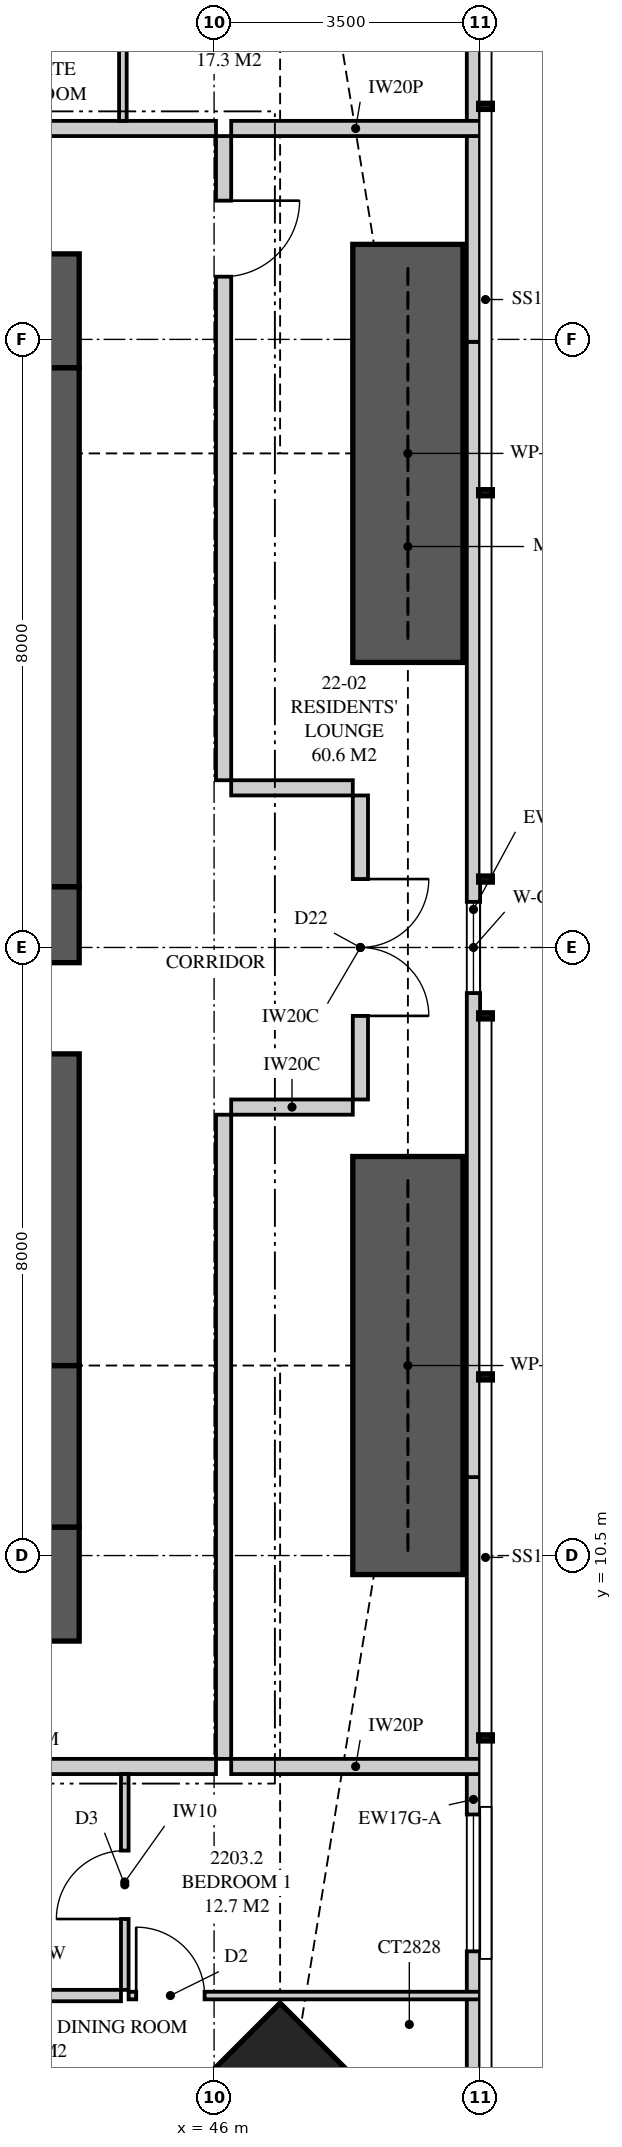
"""IFC4 building model, lengths in metres.
Left out: names, types, materials, properties, quantities, classifications, styles, units other than length and angle.
Written with IfcOpenShell. Run it as: python <this file> out.ifc"""

import sys

from ifc_helpers import new_model, si_unit, direction, frame, frame_2d, origin, origin_2d, place, context, subcontext, project, spatial, polyline, rectangle, hollow_rectangle, outline, extrude, element, fill, save


model = new_model("IFC4")
c1 = context("Model", 3, precision=1e-05, world=origin(), true_north=direction((0.0, 1.0)))
c2 = subcontext(c1, "Body", "Model", "MODEL_VIEW")
j1 = project(units=[si_unit("LENGTHUNIT", "METRE"), si_unit("PLANEANGLEUNIT", "RADIAN")], contexts=[c1])
p1 = place(None, origin())
s1 = spatial("IfcSite", under=j1, at=p1, CompositionType="ELEMENT")
p2 = place(p1, origin())
s2 = spatial("IfcBuilding", under=s1, at=p2, CompositionType="ELEMENT")
p3 = place(p2, frame((0.0, 0.0, 84.75)))
s3 = spatial("IfcBuildingStorey", under=s2, at=p3, CompositionType="ELEMENT", Elevation=84.75)
p4 = place(p3, frame((46.869, 2.631, 0.0), z_axis=(0.0, 0.0, 1.0), x_axis=(-0.707106781187, 0.707106781187, 0.0)))
e1 = element("IfcColumn", 1, at=p4, inside=s3, PredefinedType="COLUMN", context=c2, shape_type="SweptSolid", body=[
    extrude(hollow_rectangle(XDim=2.8, YDim=2.8, WallThickness=0.25, at=origin_2d()), origin(), (0.0, 0.0, 1.0), 3.35),
])
p5 = place(p3, frame((35.9, 10.125, 0.0), z_axis=(0.0, 0.0, 1.0), x_axis=(1.0, 0.0, 0.0)))
e2 = element("IfcWall", 2, at=p5, inside=s3, PredefinedType="SHEAR", context=c2, shape_type="SweptSolid", body=[
    extrude(rectangle(XDim=8.325, YDim=1.5, at=frame_2d((4.163, 0.0))), origin(), (0.0, 0.0, 1.0), 3.35),
])
p6 = place(p5, frame((2.7, 0.0, 0.0)))
e3 = element("IfcOpeningElement", 3, at=p6, cuts=e2, PredefinedType="OPENING", context=c2, shape_type="SweptSolid", body=[
    extrude(rectangle(XDim=1.0, YDim=2.1, at=frame_2d((0.5, 1.05))), frame((0.0, 0.76, 0.0), z_axis=(0.0, -1.0, 0.0), x_axis=(1.0, 0.0, 0.0)), (0.0, 0.0, 1.0), 1.52),
])
p7 = place(p3, frame((44.225, 26.875, 0.0), z_axis=(0.0, 0.0, 1.0), x_axis=(-1.0, 0.0, 0.0)))
e4 = element("IfcWall", 4, at=p7, inside=s3, PredefinedType="SHEAR", context=c2, shape_type="SweptSolid", body=[
    extrude(rectangle(XDim=8.325, YDim=1.5, at=frame_2d((4.163, 0.0))), origin(), (0.0, 0.0, 1.0), 3.35),
])
p8 = place(p7, frame((5.725, 0.0, 0.0)))
e5 = element("IfcOpeningElement", 5, at=p8, cuts=e4, PredefinedType="OPENING", context=c2, shape_type="SweptSolid", body=[
    extrude(rectangle(XDim=0.9, YDim=2.1, at=frame_2d((0.45, 1.05))), frame((0.0, 0.76, 0.0), z_axis=(0.0, -1.0, 0.0), x_axis=(1.0, 0.0, 0.0)), (0.0, 0.0, 1.0), 1.52),
])
p9 = place(p3, frame((43.8, 10.875, 0.0), z_axis=(0.0, 0.0, 1.0), x_axis=(0.0, 1.0, 0.0)))
e6 = element("IfcWall", 6, at=p9, inside=s3, PredefinedType="SHEAR", context=c2, shape_type="SweptSolid", body=[
    extrude(rectangle(XDim=2.125, YDim=0.85, at=frame_2d((1.062, 0.0))), origin(), (0.0, 0.0, 1.0), 3.35),
])
p10 = place(p3, frame((43.8, 13.0, 0.0), z_axis=(0.0, 0.0, 1.0), x_axis=(0.0, 1.0, 0.0)))
e7 = element("IfcWall", 7, at=p10, inside=s3, PredefinedType="SHEAR", context=c2, shape_type="SweptSolid", body=[
    extrude(rectangle(XDim=6.3, YDim=0.85, at=frame_2d((3.15, 0.0))), origin(), (0.0, 0.0, 1.0), 3.35),
])
p11 = place(p10, frame((4.1, 0.0, 0.0)))
e8 = element("IfcOpeningElement", 8, at=p11, cuts=e7, PredefinedType="OPENING", context=c2, shape_type="SweptSolid", body=[
    extrude(rectangle(XDim=1.2, YDim=2.2, at=frame_2d((0.6, 1.1))), frame((0.0, 0.435, 0.0), z_axis=(0.0, -1.0, 0.0), x_axis=(1.0, 0.0, 0.0)), (0.0, 0.0, 1.0), 0.87),
])
p12 = place(p3, frame((43.8, 19.3, 0.0), z_axis=(0.0, 0.0, 1.0), x_axis=(0.0, 1.0, 0.0)))
e9 = element("IfcWall", 9, at=p12, inside=s3, PredefinedType="SHEAR", context=c2, shape_type="SweptSolid", body=[
    extrude(rectangle(XDim=6.825, YDim=0.85, at=frame_2d((3.413, 0.0))), origin(), (0.0, 0.0, 1.0), 3.35),
])
p13 = place(p3, frame((49.413, 3.051, 0.0), z_axis=(0.0, 0.0, 1.0), x_axis=(0.0, 1.0, 0.0)))
e10 = element("IfcWall", 10, at=p13, inside=s3, PredefinedType="SOLIDWALL", context=c2, shape_type="SweptSolid", body=[
    extrude(rectangle(XDim=8.481, YDim=0.175, at=frame_2d((4.24, 0.0))), origin(), (0.0, 0.0, 1.0), 3.11),
])
p14 = place(p13, frame((2.242, 0.0, 0.4)))
e11 = element("IfcOpeningElement", 11, at=p14, cuts=e10, PredefinedType="OPENING", context=c2, shape_type="SweptSolid", body=[
    extrude(rectangle(XDim=1.8, YDim=1.7, at=frame_2d((0.9, 0.85))), frame((0.0, 0.097, 0.0), z_axis=(0.0, -1.0, 0.0), x_axis=(1.0, 0.0, 0.0)), (0.0, 0.0, 1.0), 0.195),
])
p15 = place(p3, frame((49.413, 11.532, 0.0), z_axis=(0.0, 0.0, 1.0), x_axis=(0.0, 1.0, 0.0)))
e12 = element("IfcWall", 12, at=p15, inside=s3, PredefinedType="SOLIDWALL", context=c2, shape_type="SweptSolid", body=[
    extrude(rectangle(XDim=14.936, YDim=0.175, at=frame_2d((7.468, 0.0))), origin(), (0.0, 0.0, 1.0), 2.15),
])
p16 = place(p15, frame((6.368, 0.0, 0.4)))
e13 = element("IfcOpeningElement", 13, at=p16, cuts=e12, PredefinedType="OPENING", context=c2, shape_type="SweptSolid", body=[
    extrude(rectangle(XDim=1.2, YDim=1.7, at=frame_2d((0.6, 0.85))), frame((0.0, 0.097, 0.0), z_axis=(0.0, -1.0, 0.0), x_axis=(1.0, 0.0, 0.0)), (0.0, 0.0, 1.0), 0.195),
])
p17 = place(p3, frame((49.413, 26.468, 0.0), z_axis=(0.0, 0.0, 1.0), x_axis=(0.0, 1.0, 0.0)))
e14 = element("IfcWall", 14, at=p17, inside=s3, PredefinedType="SOLIDWALL", context=c2, shape_type="SweptSolid", body=[
    extrude(rectangle(XDim=8.481, YDim=0.175, at=frame_2d((4.24, 0.0))), origin(), (0.0, 0.0, 1.0), 3.11),
])
p18 = place(p17, frame((3.939, 0.0, 0.4)))
e15 = element("IfcOpeningElement", 15, at=p18, cuts=e14, PredefinedType="OPENING", context=c2, shape_type="SweptSolid", body=[
    extrude(rectangle(XDim=1.8, YDim=1.7, at=frame_2d((0.9, 0.85))), frame((0.0, 0.097, 0.0), z_axis=(0.0, -1.0, 0.0), x_axis=(1.0, 0.0, 0.0)), (0.0, 0.0, 1.0), 0.195),
])
p19 = place(p3, frame((37.925, 7.725, 0.0), z_axis=(0.0, 0.0, 1.0), x_axis=(1.0, 0.0, 0.0)))
e16 = element("IfcWall", 16, at=p19, inside=s3, PredefinedType="PARTITIONING", context=c2, shape_type="SweptSolid", body=[
    extrude(outline(polyline([(0.0, 0.0), (8.1, 0.0), (8.1, 3.11), (1.046, 3.11), (1.046, 2.531), (0.354, 2.531), (0.354, 3.11), (0.0, 3.11), (0.0, 0.0)])), frame((0.0, 0.1, 0.0), z_axis=(0.0, -1.0, 0.0), x_axis=(1.0, 0.0, 0.0)), (0.0, 0.0, 1.0), 0.2),
])
p20 = place(p19, frame((2.4, 0.0, 0.0)))
e17 = element("IfcOpeningElement", 17, at=p20, cuts=e16, PredefinedType="OPENING", context=c2, shape_type="SweptSolid", body=[
    extrude(rectangle(XDim=1.05, YDim=2.2, at=frame_2d((0.525, 1.1))), frame((0.0, 0.11, 0.0), z_axis=(0.0, -1.0, 0.0), x_axis=(1.0, 0.0, 0.0)), (0.0, 0.0, 1.0), 0.22),
])
p21 = place(p3, frame((44.825, 4.786, 0.0), z_axis=(0.0, 0.0, 1.0), x_axis=(0.0, 1.0, 0.0)))
e18 = element("IfcWall", 18, at=p21, inside=s3, PredefinedType="PARTITIONING", context=c2, shape_type="SweptSolid", body=[
    extrude(rectangle(XDim=2.839, YDim=0.1, at=frame_2d((1.419, 0.0))), origin(), (0.0, 0.0, 1.0), 3.11),
])
p22 = place(p21, frame((0.932, 0.0, 0.0)))
e19 = element("IfcOpeningElement", 19, at=p22, cuts=e18, PredefinedType="OPENING", context=c2, shape_type="SweptSolid", body=[
    extrude(rectangle(XDim=0.9, YDim=2.1, at=frame_2d((0.45, 1.05))), frame((0.0, 0.06, 0.0), z_axis=(0.0, -1.0, 0.0), x_axis=(1.0, 0.0, 0.0)), (0.0, 0.0, 1.0), 0.12),
])
p23 = place(p3, frame((44.875, 4.711, 0.0), z_axis=(0.0, 0.0, 1.0), x_axis=(1.0, 0.0, 0.0)))
e20 = element("IfcWall", 20, at=p23, inside=s3, PredefinedType="PARTITIONING", context=c2, shape_type="SweptSolid", body=[
    extrude(outline(polyline([(0.0, 0.0), (4.625, 0.0), (4.625, 3.11), (3.405, 3.11), (3.405, 2.15), (1.257, 2.15), (1.257, 3.11), (0.0, 3.11), (0.0, 0.0)])), frame((0.0, 0.05, 0.0), z_axis=(0.0, -1.0, 0.0), x_axis=(1.0, 0.0, 0.0)), (0.0, 0.0, 1.0), 0.1),
])
p24 = place(p23, frame((0.1, 0.0, 0.0)))
e21 = element("IfcOpeningElement", 21, at=p24, cuts=e20, PredefinedType="OPENING", context=c2, shape_type="SweptSolid", body=[
    extrude(rectangle(XDim=0.9, YDim=2.1, at=frame_2d((0.45, 1.05))), frame((0.0, 0.06, 0.0), z_axis=(0.0, -1.0, 0.0), x_axis=(1.0, 0.0, 0.0)), (0.0, 0.0, 1.0), 0.12),
])
p25 = place(p3, frame((42.5, 4.711, 0.0), z_axis=(0.0, 0.0, 1.0), x_axis=(1.0, 0.0, 0.0)))
e22 = element("IfcWall", 22, at=p25, inside=s3, PredefinedType="PLUMBINGWALL", context=c2, shape_type="SweptSolid", body=[
    extrude(rectangle(XDim=2.275, YDim=0.15, at=frame_2d((1.137, 0.0))), origin(), (0.0, 0.0, 1.0), 3.11),
])
p26 = place(p3, frame((46.225, 7.725, 0.0), z_axis=(0.0, 0.0, 1.0), x_axis=(1.0, 0.0, 0.0)))
e23 = element("IfcWall", 23, at=p26, inside=s3, PredefinedType="PARTITIONING", context=c2, shape_type="SweptSolid", body=[
    extrude(outline(polyline([(0.0, 0.0), (3.275, 0.0), (3.275, 3.11), (2.594, 3.11), (2.594, 2.15), (0.44, 2.15), (0.44, 2.531), (0.297, 2.531), (0.297, 3.11), (0.0, 3.11), (0.0, 0.0)])), frame((0.0, 0.1, 0.0), z_axis=(0.0, -1.0, 0.0), x_axis=(1.0, 0.0, 0.0)), (0.0, 0.0, 1.0), 0.2),
])
p27 = place(p3, frame((37.6, 29.275, 0.0), z_axis=(0.0, 0.0, 1.0), x_axis=(1.0, 0.0, 0.0)))
e24 = element("IfcWall", 24, at=p27, inside=s3, PredefinedType="PARTITIONING", context=c2, shape_type="SweptSolid", body=[
    extrude(outline(polyline([(0.0, 0.0), (8.425, 0.0), (8.425, 3.11), (1.371, 3.11), (1.371, 2.531), (0.679, 2.531), (0.679, 3.11), (0.0, 3.11), (0.0, 0.0)])), frame((0.0, 0.1, 0.0), z_axis=(0.0, -1.0, 0.0), x_axis=(1.0, 0.0, 0.0)), (0.0, 0.0, 1.0), 0.2),
])
p28 = place(p27, frame((2.4, 0.0, 0.0)))
e25 = element("IfcOpeningElement", 25, at=p28, cuts=e24, PredefinedType="OPENING", context=c2, shape_type="SweptSolid", body=[
    extrude(rectangle(XDim=1.05, YDim=2.2, at=frame_2d((0.525, 1.1))), frame((0.0, 0.11, 0.0), z_axis=(0.0, -1.0, 0.0), x_axis=(1.0, 0.0, 0.0)), (0.0, 0.0, 1.0), 0.22),
])
p29 = place(p3, frame((44.8, 33.214, 0.0), z_axis=(0.0, 0.0, 1.0), x_axis=(0.0, -1.0, 0.0)))
e26 = element("IfcWall", 26, at=p29, inside=s3, PredefinedType="PARTITIONING", context=c2, shape_type="SweptSolid", body=[
    extrude(rectangle(XDim=3.839, YDim=0.1, at=frame_2d((1.919, 0.0))), origin(), (0.0, 0.0, 1.0), 3.11),
])
p30 = place(p29, frame((1.432, 0.0, 0.0)))
e27 = element("IfcOpeningElement", 27, at=p30, cuts=e26, PredefinedType="OPENING", context=c2, shape_type="SweptSolid", body=[
    extrude(rectangle(XDim=0.9, YDim=2.1, at=frame_2d((0.45, 1.05))), frame((0.0, 0.06, 0.0), z_axis=(0.0, -1.0, 0.0), x_axis=(1.0, 0.0, 0.0)), (0.0, 0.0, 1.0), 0.12),
])
p31 = place(p3, frame((46.225, 29.275, 0.0), z_axis=(0.0, 0.0, 1.0), x_axis=(1.0, 0.0, 0.0)))
e28 = element("IfcWall", 28, at=p31, inside=s3, PredefinedType="PARTITIONING", context=c2, shape_type="SweptSolid", body=[
    extrude(outline(polyline([(0.0, 0.0), (3.275, 0.0), (3.275, 3.11), (2.756, 3.11), (2.756, 2.15), (0.603, 2.15), (0.603, 2.531), (0.297, 2.531), (0.297, 3.11), (0.0, 3.11), (0.0, 0.0)])), frame((0.0, 0.1, 0.0), z_axis=(0.0, -1.0, 0.0), x_axis=(1.0, 0.0, 0.0)), (0.0, 0.0, 1.0), 0.2),
])
p32 = place(p3, frame((46.125, 7.825, 0.0), z_axis=(0.0, 0.0, 1.0), x_axis=(0.0, 1.0, 0.0)))
e29 = element("IfcWall", 29, at=p32, inside=s3, PredefinedType="PARTITIONING", context=c2, shape_type="SweptSolid", body=[
    extrude(outline(polyline([(0.0, 0.0), (8.475, 0.0), (8.475, 3.11), (5.521, 3.11), (5.521, 2.531), (4.829, 2.531), (4.829, 3.11), (0.0, 3.11), (0.0, 0.0)])), frame((0.0, 0.1, 0.0), z_axis=(0.0, -1.0, 0.0), x_axis=(1.0, 0.0, 0.0)), (0.0, 0.0, 1.0), 0.2),
])
p33 = place(p3, frame((46.125, 20.7, 0.0), z_axis=(0.0, 0.0, 1.0), x_axis=(0.0, 1.0, 0.0)))
e30 = element("IfcWall", 30, at=p33, inside=s3, PredefinedType="PARTITIONING", context=c2, shape_type="SweptSolid", body=[
    extrude(outline(polyline([(0.0, 0.0), (8.475, 0.0), (8.475, 3.11), (4.646, 3.11), (4.646, 2.531), (3.954, 2.531), (3.954, 3.11), (0.0, 3.11), (0.0, 0.0)])), frame((0.0, 0.1, 0.0), z_axis=(0.0, -1.0, 0.0), x_axis=(1.0, 0.0, 0.0)), (0.0, 0.0, 1.0), 0.2),
])
p34 = place(p33, frame((6.625, 0.0, 0.0)))
e31 = element("IfcOpeningElement", 31, at=p34, cuts=e30, PredefinedType="OPENING", context=c2, shape_type="SweptSolid", body=[
    extrude(rectangle(XDim=1.0, YDim=2.1, at=frame_2d((0.5, 1.05))), frame((0.0, 0.11, 0.0), z_axis=(0.0, -1.0, 0.0), x_axis=(1.0, 0.0, 0.0)), (0.0, 0.0, 1.0), 0.22),
])
p35 = place(p3, frame((47.925, 16.5, 0.0), z_axis=(0.0, 0.0, 1.0), x_axis=(0.0, 1.0, 0.0)))
e32 = element("IfcWall", 32, at=p35, inside=s3, PredefinedType="PARTITIONING", context=c2, shape_type="SweptSolid", body=[
    extrude(outline(polyline([(0.0, 0.0), (4.0, 0.0), (4.0, 3.11), (4.0, 2.15), (0.0, 2.15), (0.0, 3.11), (0.0, 0.0)])), frame((0.0, 0.1, 0.0), z_axis=(0.0, -1.0, 0.0), x_axis=(1.0, 0.0, 0.0)), (0.0, 0.0, 1.0), 0.2),
])
p36 = place(p35, frame((1.1, 0.0, 0.0)))
e33 = element("IfcOpeningElement", 33, at=p36, cuts=e32, PredefinedType="OPENING", context=c2, shape_type="SweptSolid", body=[
    extrude(rectangle(XDim=1.8, YDim=2.1, at=frame_2d((0.9, 1.05))), frame((0.0, 0.11, 0.0), z_axis=(0.0, -1.0, 0.0), x_axis=(1.0, 0.0, 0.0)), (0.0, 0.0, 1.0), 0.22),
])
for number, where, z_axis, x_axis in (
    (34, (46.225, 16.4, 0.0), (0.0, 0.0, 1.0), (1.0, 0.0, 0.0)),
    (35, (46.225, 20.6, 0.0), (0.0, 0.0, 1.0), (1.0, 0.0, 0.0)),
):
    element("IfcWall", number, at=place(p3, frame(where, z_axis=z_axis, x_axis=x_axis)), inside=s3, PredefinedType="PARTITIONING", context=c2, shape_type="SweptSolid", body=[
        extrude(outline(polyline([(0.0, 0.0), (1.6, 0.0), (1.6, 3.11), (1.6, 2.15), (1.215, 2.15), (1.215, 3.11), (0.0, 3.11), (0.0, 0.0)])), frame((0.0, 0.1, 0.0), z_axis=(0.0, -1.0, 0.0), x_axis=(1.0, 0.0, 0.0)), (0.0, 0.0, 1.0), 0.2),
    ])
for number, where, z_axis, x_axis in (
    (36, (48.55, 10.25, 0.0), (0.0, 0.0, 1.0), (0.0, 1.0, 0.0)),
    (37, (48.55, 22.25, 0.0), (0.0, 0.0, 1.0), (0.0, 1.0, 0.0)),
):
    element("IfcWall", number, at=place(p3, frame(where, z_axis=z_axis, x_axis=x_axis)), inside=s3, PredefinedType="SHEAR", context=c2, shape_type="SweptSolid", body=[
        extrude(rectangle(XDim=5.5, YDim=1.45, at=frame_2d((2.75, 0.0))), origin(), (0.0, 0.0, 1.0), 3.35),
    ])
p37 = place(p14, origin())
e38 = element("IfcWindow", 38, at=p37, inside=s3, PartitioningType="SINGLE_PANEL", PredefinedType="WINDOW", context=c2, shape_type="SweptSolid", body=[
    extrude(rectangle(XDim=1.8, YDim=1.7, at=frame_2d((0.9, 0.85))), frame((0.0, 0.03, 0.0), z_axis=(0.0, -1.0, 0.0), x_axis=(1.0, 0.0, 0.0)), (0.0, 0.0, 1.0), 0.06),
])
fill(e11, e38)
p38 = place(p16, origin())
e39 = element("IfcWindow", 39, at=p38, inside=s3, PartitioningType="SINGLE_PANEL", PredefinedType="WINDOW", context=c2, shape_type="SweptSolid", body=[
    extrude(rectangle(XDim=1.2, YDim=1.7, at=frame_2d((0.6, 0.85))), frame((0.0, 0.03, 0.0), z_axis=(0.0, -1.0, 0.0), x_axis=(1.0, 0.0, 0.0)), (0.0, 0.0, 1.0), 0.06),
])
fill(e13, e39)
p39 = place(p24, origin())
e40 = element("IfcDoor", 40, at=p39, inside=s3, OperationType="SINGLE_SWING_LEFT", PredefinedType="DOOR", context=c2, shape_type="SweptSolid", body=[
    extrude(rectangle(XDim=0.9, YDim=2.1, at=frame_2d((0.45, 1.05))), frame((0.0, 0.025, 0.0), z_axis=(0.0, -1.0, 0.0), x_axis=(1.0, 0.0, 0.0)), (0.0, 0.0, 1.0), 0.05),
])
fill(e21, e40)
p40 = place(p22, origin())
e41 = element("IfcDoor", 41, at=p40, inside=s3, OperationType="SINGLE_SWING_LEFT", PredefinedType="DOOR", context=c2, shape_type="SweptSolid", body=[
    extrude(rectangle(XDim=0.9, YDim=2.1, at=frame_2d((0.45, 1.05))), frame((0.0, 0.025, 0.0), z_axis=(0.0, -1.0, 0.0), x_axis=(1.0, 0.0, 0.0)), (0.0, 0.0, 1.0), 0.05),
])
fill(e19, e41)
p41 = place(p36, frame((1.8, 0.0, 0.0), z_axis=(0.0, 0.0, 1.0), x_axis=(-1.0, 0.0, 0.0)))
e42 = element("IfcDoor", 42, at=p41, inside=s3, OperationType="DOUBLE_DOOR_SINGLE_SWING", PredefinedType="DOOR", context=c2, shape_type="SweptSolid", body=[
    extrude(rectangle(XDim=1.8, YDim=2.1, at=frame_2d((0.9, 1.05))), frame((0.0, 0.025, 0.0), z_axis=(0.0, -1.0, 0.0), x_axis=(1.0, 0.0, 0.0)), (0.0, 0.0, 1.0), 0.05),
])
fill(e33, e42)
p42 = place(p34, frame((1.0, 0.0, 0.0), z_axis=(0.0, 0.0, 1.0), x_axis=(-1.0, 0.0, 0.0)))
e43 = element("IfcDoor", 43, at=p42, inside=s3, OperationType="SINGLE_SWING_LEFT", PredefinedType="DOOR", context=c2, shape_type="SweptSolid", body=[
    extrude(rectangle(XDim=1.0, YDim=2.1, at=frame_2d((0.5, 1.05))), frame((0.0, 0.025, 0.0), z_axis=(0.0, -1.0, 0.0), x_axis=(1.0, 0.0, 0.0)), (0.0, 0.0, 1.0), 0.05),
])
fill(e31, e43)
save(model, sys.argv[1])
